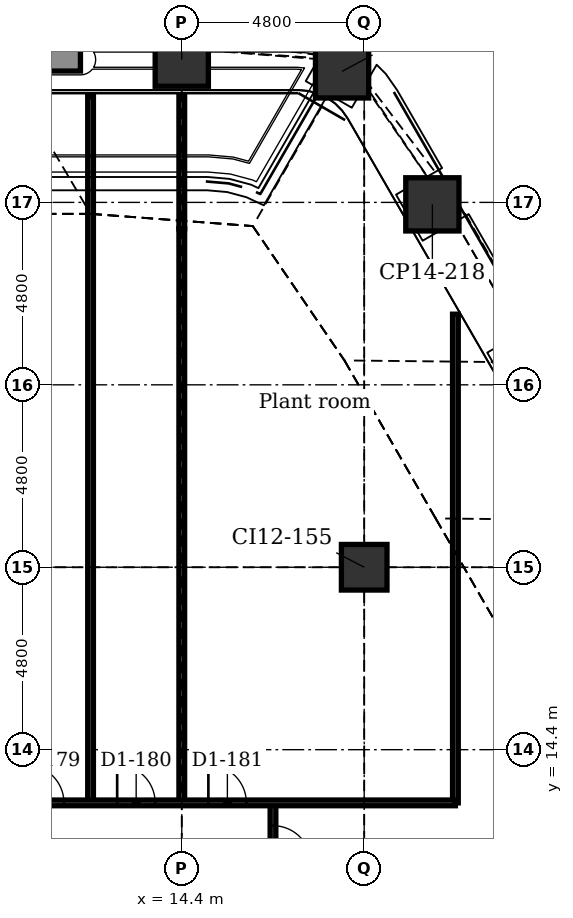
"""IFC4 building model, lengths in metres.
Left out: names, types, materials, properties, quantities, classifications, styles, units other than length and angle.
Written with IfcOpenShell. Run it as: python <this file> out.ifc"""

import sys

from ifc_helpers import new_model, si_unit, direction, frame, frame_2d, origin, origin_2d, place, context, subcontext, project, spatial, rectangle, extrude, element, fill, save


model = new_model("IFC4")
c1 = context("Model", 3, precision=1e-05, world=origin(), true_north=direction((0.0, 1.0)))
c2 = subcontext(c1, "Body", "Model", "MODEL_VIEW")
j1 = project(units=[si_unit("LENGTHUNIT", "METRE"), si_unit("PLANEANGLEUNIT", "RADIAN")], contexts=[c1])
p1 = place(None, origin())
s1 = spatial("IfcSite", under=j1, at=p1, CompositionType="ELEMENT")
p2 = place(p1, origin())
s2 = spatial("IfcBuilding", under=s1, at=p2, CompositionType="ELEMENT")
p3 = place(p2, frame((0.0, 0.0, 71.9)))
s3 = spatial("IfcBuildingStorey", under=s2, at=p3, CompositionType="ELEMENT", Elevation=71.9)
for number, where, z_axis, x_axis in (
    (1, (14.4, 32.555, -0.3), (0.0, 0.0, 1.0), (1.0, 0.0, 0.0)),
    (2, (18.618, 32.247, -0.3), (0.0, 0.0, 1.0), (0.5, 0.866, 0.0)),
    (3, (20.994, 28.749, -0.3), (0.0, 0.0, 1.0), (0.866, 0.5, 0.0)),
    (4, (23.394, 24.592, -0.3), (0.0, 0.0, 1.0), (0.866, 0.5, 0.0)),
):
    element("IfcColumn", number, at=place(p3, frame(where, z_axis=z_axis, x_axis=x_axis)), inside=s3, PredefinedType="COLUMN", context=c2, shape_type="SweptSolid", body=[
        extrude(rectangle(XDim=1.4, YDim=1.4, at=origin_2d()), origin(), (0.0, 0.0, 1.0), 6.1),
    ])
p4 = place(p3, frame((19.2, 19.2, -0.3), z_axis=(0.0, 0.0, 1.0), x_axis=(1.0, 0.0, 0.0)))
e5 = element("IfcColumn", 5, at=p4, inside=s3, PredefinedType="COLUMN", context=c2, shape_type="SweptSolid", body=[
    extrude(rectangle(XDim=1.2, YDim=1.2, at=origin_2d()), origin(), (0.0, 0.0, 1.0), 6.1),
])
p5 = place(p3, frame((5.734, 32.555, 6.0), z_axis=(0.0, 0.0, 1.0), x_axis=(1.0, 0.0, 0.0)))
e6 = element("IfcWall", 6, at=p5, inside=s3, PredefinedType="USERDEFINED", context=c2, shape_type="SweptSolid", body=[
    extrude(rectangle(XDim=6.0, YDim=0.6, at=frame_2d((3.0, 0.0))), origin(), (0.0, 0.0, 1.0), 0.7),
])
p6 = place(p3, frame((21.6, 13.0, 0.0), z_axis=(0.0, 0.0, 1.0), x_axis=(0.0, 1.0, 0.0)))
e7 = element("IfcWall", 7, at=p6, inside=s3, PredefinedType="PARTITIONING", context=c2, shape_type="SweptSolid", body=[
    extrude(rectangle(XDim=12.858, YDim=0.15, at=frame_2d((6.429, 0.0))), origin(), (0.0, 0.0, 1.0), 5.8),
])
p7 = place(p3, frame((16.8, 3.95, 0.0), z_axis=(0.0, 0.0, 1.0), x_axis=(0.0, 1.0, 0.0)))
e8 = element("IfcWall", 8, at=p7, inside=s3, PredefinedType="PARTITIONING", context=c2, shape_type="SweptSolid", body=[
    extrude(rectangle(XDim=9.05, YDim=0.15, at=frame_2d((4.525, 0.0))), origin(), (0.0, 0.0, 1.0), 5.8),
])
p8 = place(p7, frame((2.25, 0.0, 0.0)))
e9 = element("IfcOpeningElement", 9, at=p8, cuts=e8, PredefinedType="OPENING", context=c2, shape_type="SweptSolid", body=[
    extrude(rectangle(XDim=1.0, YDim=2.1, at=frame_2d((0.5, 1.05))), frame((0.0, 0.085, 0.0), z_axis=(0.0, -1.0, 0.0), x_axis=(1.0, 0.0, 0.0)), (0.0, 0.0, 1.0), 0.17),
])
p9 = place(p7, frame((7.45, 0.0, 0.0)))
e10 = element("IfcOpeningElement", 10, at=p9, cuts=e8, PredefinedType="OPENING", context=c2, shape_type="SweptSolid", body=[
    extrude(rectangle(XDim=1.0, YDim=2.1, at=frame_2d((0.5, 1.05))), frame((0.0, 0.085, 0.0), z_axis=(0.0, -1.0, 0.0), x_axis=(1.0, 0.0, 0.0)), (0.0, 0.0, 1.0), 0.17),
])
p10 = place(p3, frame((14.4, 13.0, 0.0), z_axis=(0.0, 0.0, 1.0), x_axis=(0.0, 1.0, 0.0)))
e11 = element("IfcWall", 11, at=p10, inside=s3, PredefinedType="PARTITIONING", context=c2, shape_type="SweptSolid", body=[
    extrude(rectangle(XDim=15.107, YDim=0.15, at=frame_2d((7.553, 0.0))), origin(), (0.0, 0.0, 1.0), 5.343),
])
p11 = place(p3, frame((14.4, 28.107, 0.0), z_axis=(0.0, 0.0, 1.0), x_axis=(0.0, 1.0, 0.0)))
e12 = element("IfcWall", 12, at=p11, inside=s3, PredefinedType="PARTITIONING", context=c2, shape_type="SweptSolid", body=[
    extrude(rectangle(XDim=3.479, YDim=0.15, at=frame_2d((1.739, 0.0))), origin(), (0.0, 0.0, 1.0), 5.7),
])
p12 = place(p3, frame((12.0, 13.0, 0.0), z_axis=(0.0, 0.0, 1.0), x_axis=(0.0, 1.0, 0.0)))
e13 = element("IfcWall", 13, at=p12, inside=s3, PredefinedType="PARTITIONING", context=c2, shape_type="SweptSolid", body=[
    extrude(rectangle(XDim=18.585, YDim=0.15, at=frame_2d((9.293, 0.0))), origin(), (0.0, 0.0, 1.0), 5.7),
])
p13 = place(p3, frame((-21.6, 13.0, 0.0), z_axis=(0.0, 0.0, 1.0), x_axis=(1.0, 0.0, 0.0)))
e14 = element("IfcWall", 14, at=p13, inside=s3, PredefinedType="PARTITIONING", context=c2, shape_type="SweptSolid", body=[
    extrude(rectangle(XDim=43.2, YDim=0.15, at=frame_2d((21.6, 0.0))), origin(), (0.0, 0.0, 1.0), 5.8),
])
p14 = place(p13, frame((5.5, 0.0, 0.0)))
e15 = element("IfcOpeningElement", 15, at=p14, cuts=e14, PredefinedType="OPENING", context=c2, shape_type="SweptSolid", body=[
    extrude(rectangle(XDim=1.0, YDim=2.1, at=frame_2d((0.5, 1.05))), frame((0.0, 0.085, 0.0), z_axis=(0.0, -1.0, 0.0), x_axis=(1.0, 0.0, 0.0)), (0.0, 0.0, 1.0), 0.17),
])
p15 = place(p13, frame((7.9, 0.0, 0.0)))
e16 = element("IfcOpeningElement", 16, at=p15, cuts=e14, PredefinedType="OPENING", context=c2, shape_type="SweptSolid", body=[
    extrude(rectangle(XDim=1.0, YDim=2.1, at=frame_2d((0.5, 1.05))), frame((0.0, 0.085, 0.0), z_axis=(0.0, -1.0, 0.0), x_axis=(1.0, 0.0, 0.0)), (0.0, 0.0, 1.0), 0.17),
])
p16 = place(p13, frame((10.3, 0.0, 0.0)))
e17 = element("IfcOpeningElement", 17, at=p16, cuts=e14, PredefinedType="OPENING", context=c2, shape_type="SweptSolid", body=[
    extrude(rectangle(XDim=1.0, YDim=2.1, at=frame_2d((0.5, 1.05))), frame((0.0, 0.085, 0.0), z_axis=(0.0, -1.0, 0.0), x_axis=(1.0, 0.0, 0.0)), (0.0, 0.0, 1.0), 0.17),
])
p17 = place(p13, frame((13.9, 0.0, 0.0)))
e18 = element("IfcOpeningElement", 18, at=p17, cuts=e14, PredefinedType="OPENING", context=c2, shape_type="SweptSolid", body=[
    extrude(rectangle(XDim=1.0, YDim=2.1, at=frame_2d((0.5, 1.05))), frame((0.0, 0.085, 0.0), z_axis=(0.0, -1.0, 0.0), x_axis=(1.0, 0.0, 0.0)), (0.0, 0.0, 1.0), 0.17),
])
p18 = place(p13, frame((23.5, 0.0, 0.0)))
e19 = element("IfcOpeningElement", 19, at=p18, cuts=e14, PredefinedType="OPENING", context=c2, shape_type="SweptSolid", body=[
    extrude(rectangle(XDim=1.0, YDim=2.1, at=frame_2d((0.5, 1.05))), frame((0.0, 0.085, 0.0), z_axis=(0.0, -1.0, 0.0), x_axis=(1.0, 0.0, 0.0)), (0.0, 0.0, 1.0), 0.17),
])
p19 = place(p13, frame((31.9, 0.0, 0.0)))
e20 = element("IfcOpeningElement", 20, at=p19, cuts=e14, PredefinedType="OPENING", context=c2, shape_type="SweptSolid", body=[
    extrude(rectangle(XDim=1.0, YDim=2.1, at=frame_2d((0.5, 1.05))), frame((0.0, 0.085, 0.0), z_axis=(0.0, -1.0, 0.0), x_axis=(1.0, 0.0, 0.0)), (0.0, 0.0, 1.0), 0.17),
])
p20 = place(p13, frame((34.3, 0.0, 0.0)))
e21 = element("IfcOpeningElement", 21, at=p20, cuts=e14, PredefinedType="OPENING", context=c2, shape_type="SweptSolid", body=[
    extrude(rectangle(XDim=1.0, YDim=2.1, at=frame_2d((0.5, 1.05))), frame((0.0, 0.085, 0.0), z_axis=(0.0, -1.0, 0.0), x_axis=(1.0, 0.0, 0.0)), (0.0, 0.0, 1.0), 0.17),
])
p21 = place(p13, frame((36.7, 0.0, 0.0)))
e22 = element("IfcOpeningElement", 22, at=p21, cuts=e14, PredefinedType="OPENING", context=c2, shape_type="SweptSolid", body=[
    extrude(rectangle(XDim=1.0, YDim=2.1, at=frame_2d((0.5, 1.05))), frame((0.0, 0.085, 0.0), z_axis=(0.0, -1.0, 0.0), x_axis=(1.0, 0.0, 0.0)), (0.0, 0.0, 1.0), 0.17),
])
p22 = place(p19, origin())
e23 = element("IfcDoor", 23, at=p22, inside=s3, OperationType="SINGLE_SWING_LEFT", PredefinedType="DOOR", context=c2, shape_type="SweptSolid", body=[
    extrude(rectangle(XDim=1.0, YDim=2.1, at=frame_2d((0.5, 1.05))), frame((0.0, 0.025, 0.0), z_axis=(0.0, -1.0, 0.0), x_axis=(1.0, 0.0, 0.0)), (0.0, 0.0, 1.0), 0.05),
])
fill(e20, e23)
p23 = place(p20, origin())
e24 = element("IfcDoor", 24, at=p23, inside=s3, OperationType="SINGLE_SWING_LEFT", PredefinedType="DOOR", context=c2, shape_type="SweptSolid", body=[
    extrude(rectangle(XDim=1.0, YDim=2.1, at=frame_2d((0.5, 1.05))), frame((0.0, 0.025, 0.0), z_axis=(0.0, -1.0, 0.0), x_axis=(1.0, 0.0, 0.0)), (0.0, 0.0, 1.0), 0.05),
])
fill(e21, e24)
p24 = place(p21, origin())
e25 = element("IfcDoor", 25, at=p24, inside=s3, OperationType="SINGLE_SWING_LEFT", PredefinedType="DOOR", context=c2, shape_type="SweptSolid", body=[
    extrude(rectangle(XDim=1.0, YDim=2.1, at=frame_2d((0.5, 1.05))), frame((0.0, 0.025, 0.0), z_axis=(0.0, -1.0, 0.0), x_axis=(1.0, 0.0, 0.0)), (0.0, 0.0, 1.0), 0.05),
])
fill(e22, e25)
p25 = place(p9, frame((1.0, 0.0, 0.0), z_axis=(0.0, 0.0, 1.0), x_axis=(-1.0, 0.0, 0.0)))
e26 = element("IfcDoor", 26, at=p25, inside=s3, OperationType="SINGLE_SWING_LEFT", PredefinedType="DOOR", context=c2, shape_type="SweptSolid", body=[
    extrude(rectangle(XDim=1.0, YDim=2.1, at=frame_2d((0.5, 1.05))), frame((0.0, 0.025, 0.0), z_axis=(0.0, -1.0, 0.0), x_axis=(1.0, 0.0, 0.0)), (0.0, 0.0, 1.0), 0.05),
])
fill(e10, e26)
save(model, sys.argv[1])
